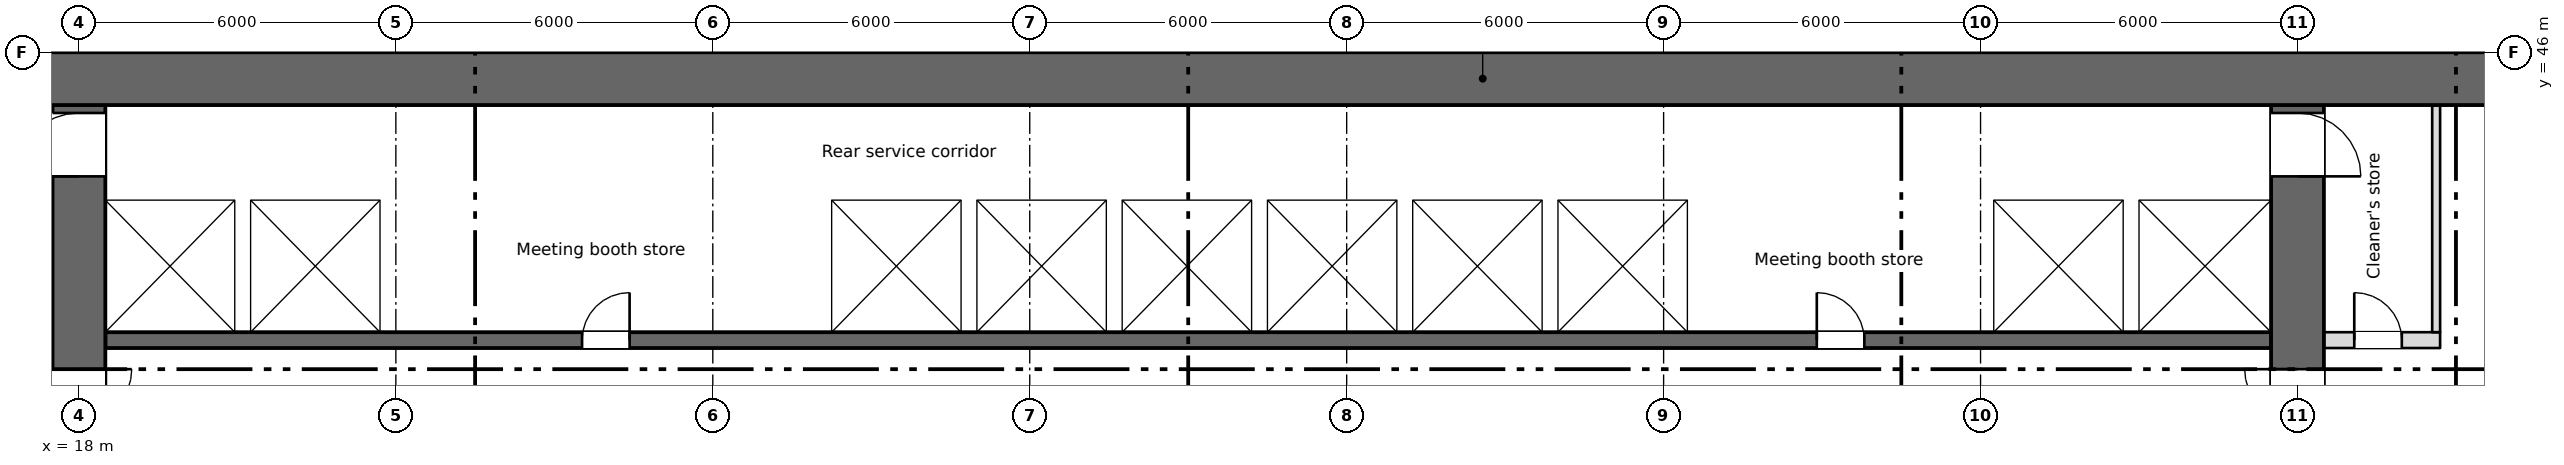
"""IFC4 building model, lengths in metres.
Left out: names, types, materials, properties, quantities, classifications, styles, units other than length and angle.
Written with IfcOpenShell. Run it as: python <this file> out.ifc"""

import sys

from ifc_helpers import new_model, si_unit, direction, frame, frame_2d, origin, place, context, subcontext, project, spatial, rectangle, extrude, element, fill, save


model = new_model("IFC4")
c1 = context("Model", 3, precision=1e-05, world=origin(), true_north=direction((0.0, 1.0)))
c2 = subcontext(c1, "Body", "Model", "MODEL_VIEW")
j1 = project(units=[si_unit("LENGTHUNIT", "METRE"), si_unit("PLANEANGLEUNIT", "RADIAN")], contexts=[c1])
p1 = place(None, origin())
s1 = spatial("IfcSite", under=j1, at=p1, CompositionType="ELEMENT")
p2 = place(p1, origin())
s2 = spatial("IfcBuilding", under=s1, at=p2, CompositionType="ELEMENT")
p3 = place(p2, frame((0.0, 0.0, 63.75)))
s3 = spatial("IfcBuildingStorey", under=s2, at=p3, CompositionType="ELEMENT", Elevation=63.75)
p4 = place(p3, frame((5.55, 45.5, 0.0), z_axis=(0.0, 0.0, 1.0), x_axis=(1.0, 0.0, 0.0)))
e1 = element("IfcWall", 1, at=p4, inside=s3, PredefinedType="SHEAR", context=c2, shape_type="SweptSolid", body=[
    extrude(rectangle(XDim=66.9, YDim=1.0, at=frame_2d((33.45, 0.0))), origin(), (0.0, 0.0, 1.0), 3.35),
])
p5 = place(p4, frame((1.2, 0.0, 0.6)))
e2 = element("IfcOpeningElement", 2, at=p5, cuts=e1, PredefinedType="OPENING", context=c2, shape_type="SweptSolid", body=[
    extrude(rectangle(XDim=0.6, YDim=2.4, at=frame_2d((0.3, 1.2))), frame((0.0, 0.51, 0.0), z_axis=(0.0, -1.0, 0.0), x_axis=(1.0, 0.0, 0.0)), (0.0, 0.0, 1.0), 1.02),
])
p6 = place(p4, frame((7.2, 0.0, 0.6)))
e3 = element("IfcOpeningElement", 3, at=p6, cuts=e1, PredefinedType="OPENING", context=c2, shape_type="SweptSolid", body=[
    extrude(rectangle(XDim=0.6, YDim=2.4, at=frame_2d((0.3, 1.2))), frame((0.0, 0.51, 0.0), z_axis=(0.0, -1.0, 0.0), x_axis=(1.0, 0.0, 0.0)), (0.0, 0.0, 1.0), 1.02),
])
p7 = place(p4, frame((61.2, 0.0, 0.6)))
e4 = element("IfcOpeningElement", 4, at=p7, cuts=e1, PredefinedType="OPENING", context=c2, shape_type="SweptSolid", body=[
    extrude(rectangle(XDim=0.6, YDim=2.4, at=frame_2d((0.3, 1.2))), frame((0.0, 0.51, 0.0), z_axis=(0.0, -1.0, 0.0), x_axis=(1.0, 0.0, 0.0)), (0.0, 0.0, 1.0), 1.02),
])
p8 = place(p3, frame((18.0, 28.4, 0.0), z_axis=(0.0, 0.0, 1.0), x_axis=(0.0, 1.0, 0.0)))
e5 = element("IfcWall", 5, at=p8, inside=s3, PredefinedType="SHEAR", context=c2, shape_type="SweptSolid", body=[
    extrude(rectangle(XDim=16.6, YDim=1.0, at=frame_2d((8.3, 0.0))), origin(), (0.0, 0.0, 1.0), 3.35),
])
p9 = place(p8, frame((9.6, 0.0, 0.0)))
e6 = element("IfcOpeningElement", 6, at=p9, cuts=e5, PredefinedType="OPENING", context=c2, shape_type="SweptSolid", body=[
    extrude(rectangle(XDim=2.0, YDim=2.1, at=frame_2d((1.0, 1.05))), frame((0.0, 0.51, 0.0), z_axis=(0.0, -1.0, 0.0), x_axis=(1.0, 0.0, 0.0)), (0.0, 0.0, 1.0), 1.02),
])
p10 = place(p8, frame((15.25, 0.0, 0.0)))
e7 = element("IfcOpeningElement", 7, at=p10, cuts=e5, PredefinedType="OPENING", context=c2, shape_type="SweptSolid", body=[
    extrude(rectangle(XDim=1.2, YDim=2.1, at=frame_2d((0.6, 1.05))), frame((0.0, 0.51, 0.0), z_axis=(0.0, -1.0, 0.0), x_axis=(1.0, 0.0, 0.0)), (0.0, 0.0, 1.0), 1.02),
])
p11 = place(p3, frame((60.0, 28.4, 0.0), z_axis=(0.0, 0.0, 1.0), x_axis=(0.0, 1.0, 0.0)))
e8 = element("IfcWall", 8, at=p11, inside=s3, PredefinedType="SHEAR", context=c2, shape_type="SweptSolid", body=[
    extrude(rectangle(XDim=16.6, YDim=1.0, at=frame_2d((8.3, 0.0))), origin(), (0.0, 0.0, 1.0), 3.35),
])
p12 = place(p11, frame((9.6, 0.0, 0.0)))
e9 = element("IfcOpeningElement", 9, at=p12, cuts=e8, PredefinedType="OPENING", context=c2, shape_type="SweptSolid", body=[
    extrude(rectangle(XDim=2.0, YDim=2.1, at=frame_2d((1.0, 1.05))), frame((0.0, 0.51, 0.0), z_axis=(0.0, -1.0, 0.0), x_axis=(1.0, 0.0, 0.0)), (0.0, 0.0, 1.0), 1.02),
])
p13 = place(p11, frame((15.25, 0.0, 0.0)))
e10 = element("IfcOpeningElement", 10, at=p13, cuts=e8, PredefinedType="OPENING", context=c2, shape_type="SweptSolid", body=[
    extrude(rectangle(XDim=1.2, YDim=2.1, at=frame_2d((0.6, 1.05))), frame((0.0, 0.51, 0.0), z_axis=(0.0, -1.0, 0.0), x_axis=(1.0, 0.0, 0.0)), (0.0, 0.0, 1.0), 1.02),
])
p14 = place(p3, frame((18.5, 40.55, 0.0), z_axis=(0.0, 0.0, 1.0), x_axis=(1.0, 0.0, 0.0)))
e11 = element("IfcWall", 11, at=p14, inside=s3, PredefinedType="SHEAR", context=c2, shape_type="SweptSolid", body=[
    extrude(rectangle(XDim=41.0, YDim=0.3, at=frame_2d((20.5, 0.0))), origin(), (0.0, 0.0, 1.0), 3.35),
])
p15 = place(p14, frame((9.025, 0.0, 0.0)))
e12 = element("IfcOpeningElement", 12, at=p15, cuts=e11, PredefinedType="OPENING", context=c2, shape_type="SweptSolid", body=[
    extrude(rectangle(XDim=0.9, YDim=2.1, at=frame_2d((0.45, 1.05))), frame((0.0, 0.16, 0.0), z_axis=(0.0, -1.0, 0.0), x_axis=(1.0, 0.0, 0.0)), (0.0, 0.0, 1.0), 0.32),
])
p16 = place(p14, frame((32.4, 0.0, 0.0)))
e13 = element("IfcOpeningElement", 13, at=p16, cuts=e11, PredefinedType="OPENING", context=c2, shape_type="SweptSolid", body=[
    extrude(rectangle(XDim=0.9, YDim=2.1, at=frame_2d((0.45, 1.05))), frame((0.0, 0.16, 0.0), z_axis=(0.0, -1.0, 0.0), x_axis=(1.0, 0.0, 0.0)), (0.0, 0.0, 1.0), 0.32),
])
p17 = place(p14, frame((14.425, 0.0, 0.0)))
e14 = element("IfcOpeningElement", 14, at=p17, cuts=e11, PredefinedType="OPENING", context=c2, shape_type="SweptSolid", body=[
    extrude(rectangle(XDim=1.1, YDim=2.1, at=frame_2d((0.55, 1.05))), frame((0.0, 0.16, 0.0), z_axis=(0.0, -1.0, 0.0), x_axis=(1.0, 0.0, 0.0)), (0.0, 0.0, 1.0), 0.32),
])
p18 = place(p14, frame((17.175, 0.0, 0.0)))
e15 = element("IfcOpeningElement", 15, at=p18, cuts=e11, PredefinedType="OPENING", context=c2, shape_type="SweptSolid", body=[
    extrude(rectangle(XDim=1.1, YDim=2.1, at=frame_2d((0.55, 1.05))), frame((0.0, 0.16, 0.0), z_axis=(0.0, -1.0, 0.0), x_axis=(1.0, 0.0, 0.0)), (0.0, 0.0, 1.0), 0.32),
])
p19 = place(p14, frame((19.925, 0.0, 0.0)))
e16 = element("IfcOpeningElement", 16, at=p19, cuts=e11, PredefinedType="OPENING", context=c2, shape_type="SweptSolid", body=[
    extrude(rectangle(XDim=1.1, YDim=2.1, at=frame_2d((0.55, 1.05))), frame((0.0, 0.16, 0.0), z_axis=(0.0, -1.0, 0.0), x_axis=(1.0, 0.0, 0.0)), (0.0, 0.0, 1.0), 0.32),
])
p20 = place(p14, frame((22.675, 0.0, 0.0)))
e17 = element("IfcOpeningElement", 17, at=p20, cuts=e11, PredefinedType="OPENING", context=c2, shape_type="SweptSolid", body=[
    extrude(rectangle(XDim=1.1, YDim=2.1, at=frame_2d((0.55, 1.05))), frame((0.0, 0.16, 0.0), z_axis=(0.0, -1.0, 0.0), x_axis=(1.0, 0.0, 0.0)), (0.0, 0.0, 1.0), 0.32),
])
p21 = place(p14, frame((36.375, 0.0, 0.0)))
e18 = element("IfcOpeningElement", 18, at=p21, cuts=e11, PredefinedType="OPENING", context=c2, shape_type="SweptSolid", body=[
    extrude(rectangle(XDim=1.2, YDim=2.1, at=frame_2d((0.6, 1.05))), frame((0.0, 0.16, 0.0), z_axis=(0.0, -1.0, 0.0), x_axis=(1.0, 0.0, 0.0)), (0.0, 0.0, 1.0), 0.32),
])
p22 = place(p14, frame((39.15, 0.0, 0.0)))
e19 = element("IfcOpeningElement", 19, at=p22, cuts=e11, PredefinedType="OPENING", context=c2, shape_type="SweptSolid", body=[
    extrude(rectangle(XDim=1.2, YDim=2.1, at=frame_2d((0.6, 1.05))), frame((0.0, 0.16, 0.0), z_axis=(0.0, -1.0, 0.0), x_axis=(1.0, 0.0, 0.0)), (0.0, 0.0, 1.0), 0.32),
])
p23 = place(p3, frame((18.5, 43.35, 0.0), z_axis=(0.0, 0.0, 1.0), x_axis=(1.0, 0.0, 0.0)))
e20 = element("IfcWall", 20, at=p23, inside=s3, PredefinedType="SHEAR", context=c2, shape_type="SweptSolid", body=[
    extrude(rectangle(XDim=41.0, YDim=0.3, at=frame_2d((20.5, 0.0))), origin(), (0.0, 0.0, 1.0), 3.35),
])
p24 = place(p3, frame((60.5, 40.55, 0.0), z_axis=(0.0, 0.0, 1.0), x_axis=(1.0, 0.0, 0.0)))
e21 = element("IfcWall", 21, at=p24, inside=s3, PredefinedType="PARTITIONING", context=c2, shape_type="SweptSolid", body=[
    extrude(rectangle(XDim=2.2, YDim=0.3, at=frame_2d((1.1, 0.0))), origin(), (0.0, 0.0, 1.0), 3.35),
])
p25 = place(p24, frame((0.575, 0.0, 0.0)))
e22 = element("IfcOpeningElement", 22, at=p25, cuts=e21, PredefinedType="OPENING", context=c2, shape_type="SweptSolid", body=[
    extrude(rectangle(XDim=0.9, YDim=2.1, at=frame_2d((0.45, 1.05))), frame((0.0, 0.16, 0.0), z_axis=(0.0, -1.0, 0.0), x_axis=(1.0, 0.0, 0.0)), (0.0, 0.0, 1.0), 0.32),
])
for number, where, z_axis, x_axis in (
    (23, (21.1, 40.7, 0.0), (0.0, 0.0, 1.0), (0.0, 1.0, 0.0)),
    (24, (23.85, 40.7, 0.0), (0.0, 0.0, 1.0), (0.0, 1.0, 0.0)),
    (25, (32.1, 40.7, 0.0), (0.0, 0.0, 1.0), (0.0, 1.0, 0.0)),
    (26, (34.85, 40.7, 0.0), (0.0, 0.0, 1.0), (0.0, 1.0, 0.0)),
    (27, (37.6, 40.7, 0.0), (0.0, 0.0, 1.0), (0.0, 1.0, 0.0)),
    (28, (40.35, 40.7, 0.0), (0.0, 0.0, 1.0), (0.0, 1.0, 0.0)),
    (29, (43.1, 40.7, 0.0), (0.0, 0.0, 1.0), (0.0, 1.0, 0.0)),
    (30, (45.85, 40.7, 0.0), (0.0, 0.0, 1.0), (0.0, 1.0, 0.0)),
    (31, (48.6, 40.7, 0.0), (0.0, 0.0, 1.0), (0.0, 1.0, 0.0)),
    (32, (54.1, 40.7, 0.0), (0.0, 0.0, 1.0), (0.0, 1.0, 0.0)),
    (33, (56.85, 40.7, 0.0), (0.0, 0.0, 1.0), (0.0, 1.0, 0.0)),
):
    element("IfcWall", number, at=place(p3, frame(where, z_axis=z_axis, x_axis=x_axis)), inside=s3, PredefinedType="SHEAR", context=c2, shape_type="SweptSolid", body=[
        extrude(rectangle(XDim=2.5, YDim=0.3, at=frame_2d((1.25, 0.0))), origin(), (0.0, 0.0, 1.0), 3.35),
    ])
p26 = place(p3, frame((62.625, 40.7, 0.0), z_axis=(0.0, 0.0, 1.0), x_axis=(0.0, 1.0, 0.0)))
e34 = element("IfcWall", 34, at=p26, inside=s3, PredefinedType="PARTITIONING", context=c2, shape_type="SweptSolid", body=[
    extrude(rectangle(XDim=4.3, YDim=0.15, at=frame_2d((2.15, 0.0))), origin(), (0.0, 0.0, 1.0), 3.35),
])
p27 = place(p25, origin())
e35 = element("IfcDoor", 35, at=p27, inside=s3, OperationType="SINGLE_SWING_LEFT", PredefinedType="DOOR", context=c2, shape_type="SweptSolid", body=[
    extrude(rectangle(XDim=0.9, YDim=2.1, at=frame_2d((0.45, 1.05))), frame((0.0, 0.025, 0.0), z_axis=(0.0, -1.0, 0.0), x_axis=(1.0, 0.0, 0.0)), (0.0, 0.0, 1.0), 0.05),
])
fill(e22, e35)
p28 = place(p15, origin())
e36 = element("IfcDoor", 36, at=p28, inside=s3, OperationType="SINGLE_SWING_RIGHT", PredefinedType="DOOR", context=c2, shape_type="SweptSolid", body=[
    extrude(rectangle(XDim=0.9, YDim=2.1, at=frame_2d((0.45, 1.05))), frame((0.0, 0.025, 0.0), z_axis=(0.0, -1.0, 0.0), x_axis=(1.0, 0.0, 0.0)), (0.0, 0.0, 1.0), 0.05),
])
fill(e12, e36)
p29 = place(p16, origin())
e37 = element("IfcDoor", 37, at=p29, inside=s3, OperationType="SINGLE_SWING_LEFT", PredefinedType="DOOR", context=c2, shape_type="SweptSolid", body=[
    extrude(rectangle(XDim=0.9, YDim=2.1, at=frame_2d((0.45, 1.05))), frame((0.0, 0.025, 0.0), z_axis=(0.0, -1.0, 0.0), x_axis=(1.0, 0.0, 0.0)), (0.0, 0.0, 1.0), 0.05),
])
fill(e13, e37)
p30 = place(p17, origin())
e38 = element("IfcDoor", 38, at=p30, inside=s3, OperationType="SLIDING_TO_LEFT", PredefinedType="DOOR", context=c2, shape_type="SweptSolid", body=[
    extrude(rectangle(XDim=1.1, YDim=2.1, at=frame_2d((0.55, 1.05))), frame((0.0, 0.025, 0.0), z_axis=(0.0, -1.0, 0.0), x_axis=(1.0, 0.0, 0.0)), (0.0, 0.0, 1.0), 0.05),
])
fill(e14, e38)
p31 = place(p18, origin())
e39 = element("IfcDoor", 39, at=p31, inside=s3, OperationType="SLIDING_TO_LEFT", PredefinedType="DOOR", context=c2, shape_type="SweptSolid", body=[
    extrude(rectangle(XDim=1.1, YDim=2.1, at=frame_2d((0.55, 1.05))), frame((0.0, 0.025, 0.0), z_axis=(0.0, -1.0, 0.0), x_axis=(1.0, 0.0, 0.0)), (0.0, 0.0, 1.0), 0.05),
])
fill(e15, e39)
p32 = place(p19, origin())
e40 = element("IfcDoor", 40, at=p32, inside=s3, OperationType="SLIDING_TO_LEFT", PredefinedType="DOOR", context=c2, shape_type="SweptSolid", body=[
    extrude(rectangle(XDim=1.1, YDim=2.1, at=frame_2d((0.55, 1.05))), frame((0.0, 0.025, 0.0), z_axis=(0.0, -1.0, 0.0), x_axis=(1.0, 0.0, 0.0)), (0.0, 0.0, 1.0), 0.05),
])
fill(e16, e40)
p33 = place(p20, origin())
e41 = element("IfcDoor", 41, at=p33, inside=s3, OperationType="SLIDING_TO_LEFT", PredefinedType="DOOR", context=c2, shape_type="SweptSolid", body=[
    extrude(rectangle(XDim=1.1, YDim=2.1, at=frame_2d((0.55, 1.05))), frame((0.0, 0.025, 0.0), z_axis=(0.0, -1.0, 0.0), x_axis=(1.0, 0.0, 0.0)), (0.0, 0.0, 1.0), 0.05),
])
fill(e17, e41)
p34 = place(p21, origin())
e42 = element("IfcDoor", 42, at=p34, inside=s3, OperationType="SLIDING_TO_LEFT", PredefinedType="DOOR", context=c2, shape_type="SweptSolid", body=[
    extrude(rectangle(XDim=1.2, YDim=2.1, at=frame_2d((0.6, 1.05))), frame((0.0, 0.025, 0.0), z_axis=(0.0, -1.0, 0.0), x_axis=(1.0, 0.0, 0.0)), (0.0, 0.0, 1.0), 0.05),
])
fill(e18, e42)
p35 = place(p22, origin())
e43 = element("IfcDoor", 43, at=p35, inside=s3, OperationType="SLIDING_TO_LEFT", PredefinedType="DOOR", context=c2, shape_type="SweptSolid", body=[
    extrude(rectangle(XDim=1.2, YDim=2.1, at=frame_2d((0.6, 1.05))), frame((0.0, 0.025, 0.0), z_axis=(0.0, -1.0, 0.0), x_axis=(1.0, 0.0, 0.0)), (0.0, 0.0, 1.0), 0.05),
])
fill(e19, e43)
p36 = place(p9, origin())
e44 = element("IfcDoor", 44, at=p36, inside=s3, OperationType="DOUBLE_DOOR_SINGLE_SWING", PredefinedType="DOOR", context=c2, shape_type="SweptSolid", body=[
    extrude(rectangle(XDim=2.0, YDim=2.1, at=frame_2d((1.0, 1.05))), frame((0.0, 0.025, 0.0), z_axis=(0.0, -1.0, 0.0), x_axis=(1.0, 0.0, 0.0)), (0.0, 0.0, 1.0), 0.05),
])
fill(e6, e44)
p37 = place(p12, origin())
e45 = element("IfcDoor", 45, at=p37, inside=s3, OperationType="DOUBLE_DOOR_SINGLE_SWING", PredefinedType="DOOR", context=c2, shape_type="SweptSolid", body=[
    extrude(rectangle(XDim=2.0, YDim=2.1, at=frame_2d((1.0, 1.05))), frame((0.0, 0.025, 0.0), z_axis=(0.0, -1.0, 0.0), x_axis=(1.0, 0.0, 0.0)), (0.0, 0.0, 1.0), 0.05),
])
fill(e9, e45)
p38 = place(p10, origin())
e46 = element("IfcDoor", 46, at=p38, inside=s3, OperationType="SINGLE_SWING_LEFT", PredefinedType="DOOR", context=c2, shape_type="SweptSolid", body=[
    extrude(rectangle(XDim=1.2, YDim=2.1, at=frame_2d((0.6, 1.05))), frame((0.0, 0.025, 0.0), z_axis=(0.0, -1.0, 0.0), x_axis=(1.0, 0.0, 0.0)), (0.0, 0.0, 1.0), 0.05),
])
fill(e7, e46)
p39 = place(p13, origin())
e47 = element("IfcDoor", 47, at=p39, inside=s3, OperationType="SINGLE_SWING_LEFT", PredefinedType="DOOR", context=c2, shape_type="SweptSolid", body=[
    extrude(rectangle(XDim=1.2, YDim=2.1, at=frame_2d((0.6, 1.05))), frame((0.0, 0.025, 0.0), z_axis=(0.0, -1.0, 0.0), x_axis=(1.0, 0.0, 0.0)), (0.0, 0.0, 1.0), 0.05),
])
fill(e10, e47)
save(model, sys.argv[1])
